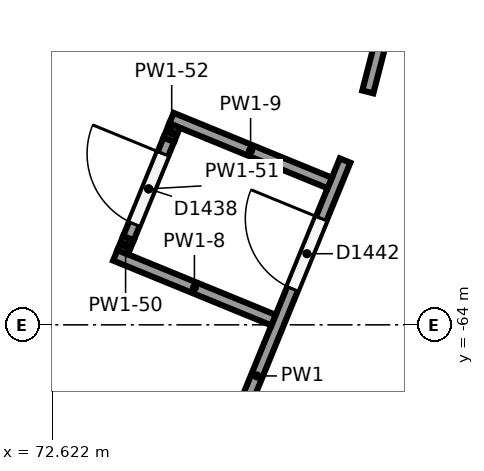
"""IFC4 building model, lengths in metres.
Left out: names, types, materials, properties, quantities, classifications, styles, units other than length and angle.
Written with IfcOpenShell. Run it as: python <this file> out.ifc"""

import sys

from ifc_helpers import new_model, si_unit, direction, frame, frame_2d, origin, place, context, subcontext, project, spatial, rectangle, extrude, element, fill, save


model = new_model("IFC4")
c1 = context("Model", 3, precision=1e-05, world=origin(), true_north=direction((0.0, 1.0)))
c2 = subcontext(c1, "Body", "Model", "MODEL_VIEW")
j1 = project(units=[si_unit("LENGTHUNIT", "METRE"), si_unit("PLANEANGLEUNIT", "RADIAN")], contexts=[c1])
p1 = place(None, origin())
s1 = spatial("IfcSite", under=j1, at=p1, CompositionType="ELEMENT")
p2 = place(p1, origin())
s2 = spatial("IfcBuilding", under=s1, at=p2, CompositionType="ELEMENT")
p3 = place(p2, frame((0.0, 0.0, 18.0)))
s3 = spatial("IfcBuildingStorey", under=s2, at=p3, CompositionType="ELEMENT", Elevation=18.0)
p4 = place(p3, frame((79.605, -63.055, 0.0), z_axis=(0.0, 0.0, 1.0), x_axis=(-0.532032873767, -0.846723698281, 0.0)))
e1 = element("IfcWall", 1, at=p4, inside=s3, PredefinedType="PARTITIONING", context=c2, shape_type="SweptSolid", body=[
    extrude(rectangle(XDim=6.49, YDim=0.15, at=frame_2d((3.245, 0.0))), origin(), (0.0, 0.0, 1.0), 5.6),
])
p5 = place(p3, frame((74.154, -67.506, 0.0), z_axis=(0.0, 0.0, 1.0), x_axis=(0.379103117109, 0.92535443296, 0.0)))
e2 = element("IfcWall", 2, at=p5, inside=s3, PredefinedType="PARTITIONING", context=c2, shape_type="SweptSolid", body=[
    extrude(rectangle(XDim=6.125, YDim=0.15, at=frame_2d((3.062, 0.0))), origin(), (0.0, 0.0, 1.0), 5.6),
])
p6 = place(p5, frame((4.3, 0.0, 0.0)))
e3 = element("IfcOpeningElement", 3, at=p6, cuts=e2, PredefinedType="OPENING", context=c2, shape_type="SweptSolid", body=[
    extrude(rectangle(XDim=1.0, YDim=2.1, at=frame_2d((0.5, 1.05))), frame((0.0, 0.085, 0.0), z_axis=(0.0, -1.0, 0.0), x_axis=(1.0, 0.0, 0.0)), (0.0, 0.0, 1.0), 0.17),
])
p7 = place(p3, frame((76.775, -60.936, 0.0), z_axis=(0.0, 0.0, 1.0), x_axis=(0.249120216744, 0.968472569363, 0.0)))
e4 = element("IfcWall", 4, at=p7, inside=s3, PredefinedType="PARTITIONING", context=c2, shape_type="SweptSolid", body=[
    extrude(rectangle(XDim=6.198, YDim=0.15, at=frame_2d((3.099, 0.0))), origin(), (0.0, 0.0, 1.0), 5.6),
])
p8 = place(p3, frame((75.534, -63.938, 0.0), z_axis=(0.0, 0.0, 1.0), x_axis=(-0.925346328849, 0.379122897866, 0.0)))
e5 = element("IfcWall", 5, at=p8, inside=s3, PredefinedType="PARTITIONING", context=c2, shape_type="SweptSolid", body=[
    extrude(rectangle(XDim=2.25, YDim=0.15, at=frame_2d((1.125, 0.0))), origin(), (0.0, 0.0, 1.0), 5.669),
])
p9 = place(p3, frame((76.274, -62.134, 0.0), z_axis=(0.0, 0.0, 1.0), x_axis=(-0.925346328849, 0.379122897866, 0.0)))
e6 = element("IfcWall", 6, at=p9, inside=s3, PredefinedType="PARTITIONING", context=c2, shape_type="SweptSolid", body=[
    extrude(rectangle(XDim=2.25, YDim=0.15, at=frame_2d((1.125, 0.0))), origin(), (0.0, 0.0, 1.0), 5.685),
])
p10 = place(p3, frame((73.55, -63.044, 0.0), z_axis=(0.0, 0.0, 1.0), x_axis=(0.378537750025, 0.925585853287, 0.0)))
e7 = element("IfcWall", 7, at=p10, inside=s3, PredefinedType="PARTITIONING", context=c2, shape_type="SweptSolid", body=[
    extrude(rectangle(XDim=0.2, YDim=0.15, at=frame_2d((0.1, 0.0))), origin(), (0.0, 0.0, 1.0), 5.716),
])
p11 = place(p3, frame((73.626, -62.859, 0.0), z_axis=(0.0, 0.0, 1.0), x_axis=(0.379135295196, 0.925341249452, 0.0)))
e8 = element("IfcWall", 8, at=p11, inside=s3, PredefinedType="PARTITIONING", context=c2, shape_type="SweptSolid", body=[
    extrude(rectangle(XDim=1.4, YDim=0.15, at=frame_2d((0.7, 0.0))), origin(), (0.0, 0.0, 1.0), 5.718),
])
p12 = place(p11, frame((0.2, 0.0, 0.0)))
e9 = element("IfcOpeningElement", 9, at=p12, cuts=e8, PredefinedType="OPENING", context=c2, shape_type="SweptSolid", body=[
    extrude(rectangle(XDim=1.0, YDim=2.1, at=frame_2d((0.5, 1.05))), frame((0.0, 0.085, 0.0), z_axis=(0.0, -1.0, 0.0), x_axis=(1.0, 0.0, 0.0)), (0.0, 0.0, 1.0), 0.17),
])
p13 = place(p3, frame((74.157, -61.564, 0.0), z_axis=(0.0, 0.0, 1.0), x_axis=(0.379583143074, 0.925157628458, 0.0)))
e10 = element("IfcWall", 10, at=p13, inside=s3, PredefinedType="PARTITIONING", context=c2, shape_type="SweptSolid", body=[
    extrude(rectangle(XDim=0.2, YDim=0.15, at=frame_2d((0.1, 0.0))), origin(), (0.0, 0.0, 1.0), 5.729),
])
p14 = place(p6, origin())
e11 = element("IfcDoor", 11, at=p14, inside=s3, OperationType="SINGLE_SWING_RIGHT", PredefinedType="DOOR", context=c2, shape_type="SweptSolid", body=[
    extrude(rectangle(XDim=1.0, YDim=2.1, at=frame_2d((0.5, 1.05))), frame((0.0, 0.025, 0.0), z_axis=(0.0, -1.0, 0.0), x_axis=(1.0, 0.0, 0.0)), (0.0, 0.0, 1.0), 0.05),
])
fill(e3, e11)
p15 = place(p12, origin())
e12 = element("IfcDoor", 12, at=p15, inside=s3, OperationType="SINGLE_SWING_RIGHT", PredefinedType="DOOR", context=c2, shape_type="SweptSolid", body=[
    extrude(rectangle(XDim=1.0, YDim=2.1, at=frame_2d((0.5, 1.05))), frame((0.0, 0.025, 0.0), z_axis=(0.0, -1.0, 0.0), x_axis=(1.0, 0.0, 0.0)), (0.0, 0.0, 1.0), 0.05),
])
fill(e9, e12)
save(model, sys.argv[1])
